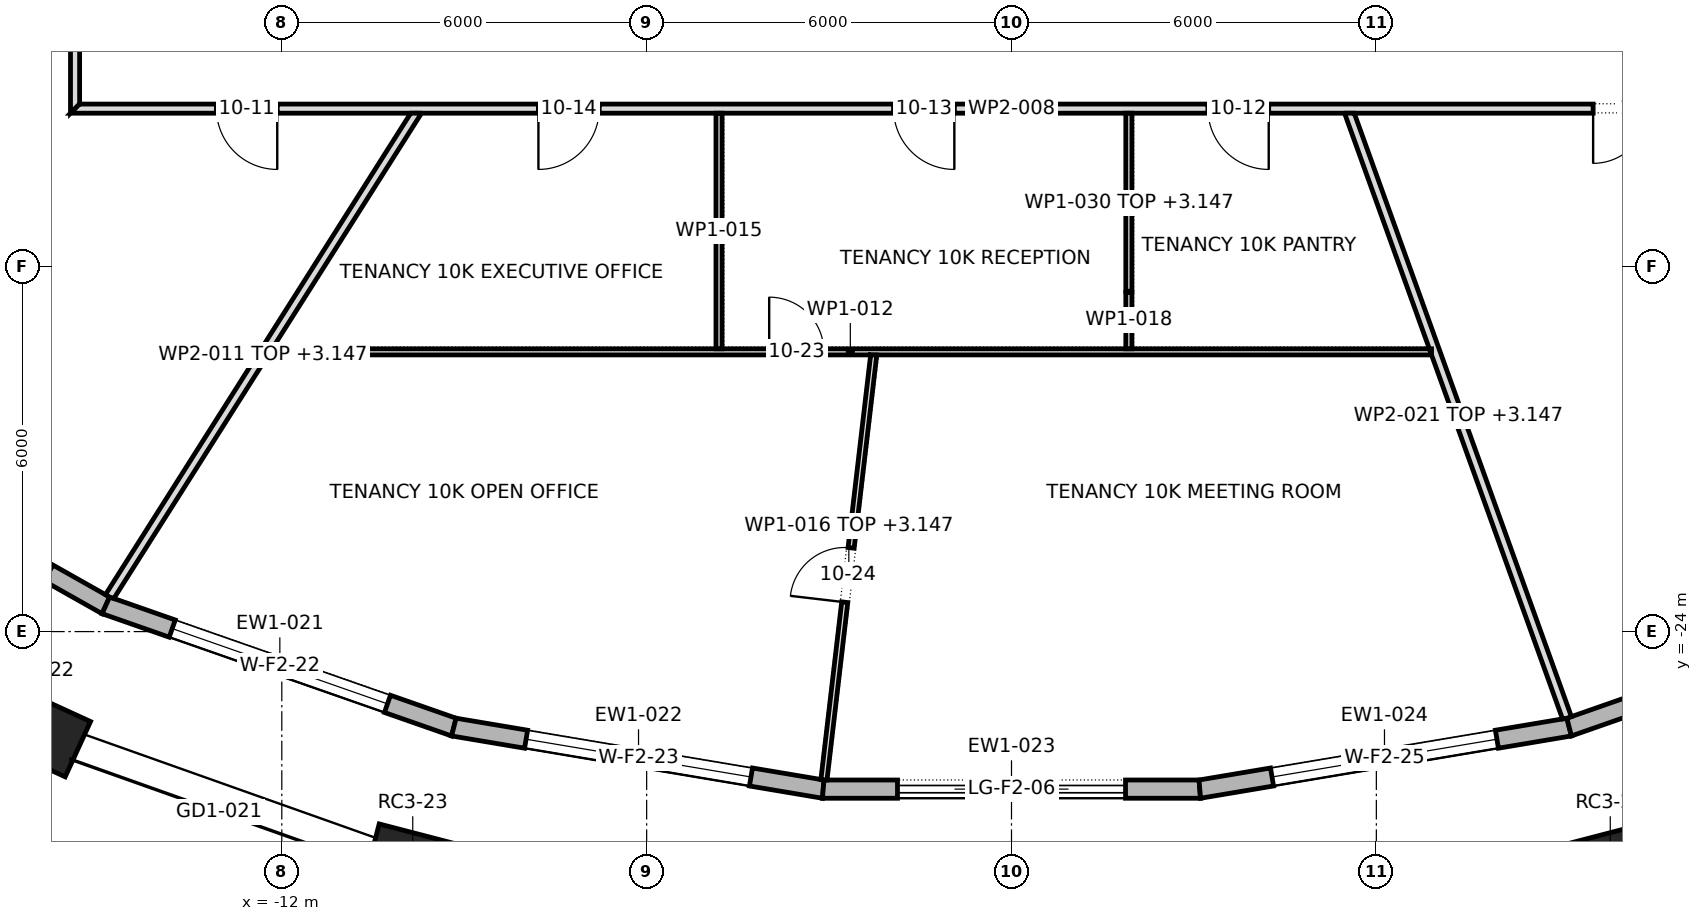
"""IFC4 building model, lengths in metres.
Left out: names, types, materials, properties, quantities, classifications, styles, units other than length and angle.
Written with IfcOpenShell. Run it as: python <this file> out.ifc"""

import sys

from ifc_helpers import new_model, si_unit, direction, frame, frame_2d, origin, origin_2d, place, context, subcontext, project, spatial, polyline, rectangle, outline, extrude, element, fill, save


model = new_model("IFC4")
c1 = context("Model", 3, precision=1e-05, world=origin(), true_north=direction((0.0, 1.0)))
c2 = subcontext(c1, "Body", "Model", "MODEL_VIEW")
j1 = project(units=[si_unit("LENGTHUNIT", "METRE"), si_unit("PLANEANGLEUNIT", "RADIAN")], contexts=[c1])
p1 = place(None, origin())
s1 = spatial("IfcSite", under=j1, at=p1, CompositionType="ELEMENT")
p2 = place(p1, origin())
s2 = spatial("IfcBuilding", under=s1, at=p2, CompositionType="ELEMENT")
p3 = place(p2, frame((0.0, 0.0, 150.7)))
s3 = spatial("IfcBuildingStorey", under=s2, at=p3, CompositionType="ELEMENT", Elevation=150.7)
for number, where, z_axis, x_axis in (
    (1, (-15.99, -25.642, 0.0), (0.0, 0.0, 1.0), (0.909, -0.417, 0.0)),
    (2, (-9.847, -27.823, 0.0), (0.0, 0.0, 1.0), (0.968, -0.252, 0.0)),
    (3, (9.847, -27.823, 0.0), (0.0, 0.0, 1.0), (0.968, 0.252, 0.0)),
):
    element("IfcColumn", number, at=place(p3, frame(where, z_axis=z_axis, x_axis=x_axis)), inside=s3, PredefinedType="COLUMN", context=c2, shape_type="SweptSolid", body=[
        extrude(rectangle(XDim=1.4, YDim=1.0, at=origin_2d()), origin(), (0.0, 0.0, 1.0), 4.2),
    ])
p4 = place(p3, frame((-20.046, -20.661, 0.0), z_axis=(0.0, 0.0, 1.0), x_axis=(0.870912346166, -0.491438384028, 0.0)))
e4 = element("IfcWall", 4, at=p4, inside=s3, PredefinedType="STANDARD", context=c2, shape_type="SweptSolid", body=[
    extrude(outline(polyline([(-0.014, -0.15), (5.929, -0.15), (5.902, 0.15), (0.014, 0.15), (-0.014, -0.15)])), origin(), (0.0, 0.0, 1.0), 3.9),
])
p5 = place(p4, frame((1.083, 0.0, 0.6)))
e5 = element("IfcOpeningElement", 5, at=p5, cuts=e4, PredefinedType="OPENING", context=c2, shape_type="SweptSolid", body=[
    extrude(rectangle(XDim=3.75, YDim=2.85, at=frame_2d((1.875, 1.425))), frame((0.0, 0.162, 0.0), z_axis=(0.0, -1.0, 0.0), x_axis=(1.0, 0.0, 0.0)), (0.0, 0.0, 1.0), 0.324),
])
p6 = place(p3, frame((-14.894, -23.569, 0.0), z_axis=(0.0, 0.0, 1.0), x_axis=(0.943925510212, -0.330158494016, 0.0)))
e6 = element("IfcWall", 6, at=p6, inside=s3, PredefinedType="STANDARD", context=c2, shape_type="SweptSolid", body=[
    extrude(outline(polyline([(-0.013, -0.15), (6.076, -0.15), (6.05, 0.15), (0.013, 0.15), (-0.013, -0.15)])), origin(), (0.0, 0.0, 1.0), 3.9),
])
p7 = place(p6, frame((1.156, 0.0, 0.6)))
e7 = element("IfcOpeningElement", 7, at=p7, cuts=e6, PredefinedType="OPENING", context=c2, shape_type="SweptSolid", body=[
    extrude(rectangle(XDim=3.75, YDim=2.85, at=frame_2d((1.875, 1.425))), frame((0.0, 0.162, 0.0), z_axis=(0.0, -1.0, 0.0), x_axis=(1.0, 0.0, 0.0)), (0.0, 0.0, 1.0), 0.324),
])
p8 = place(p3, frame((-9.171, -25.57, 0.0), z_axis=(0.0, 0.0, 1.0), x_axis=(0.986186393203, -0.165639360845, 0.0)))
e8 = element("IfcWall", 8, at=p8, inside=s3, PredefinedType="STANDARD", context=c2, shape_type="SweptSolid", body=[
    extrude(outline(polyline([(-0.013, -0.15), (6.172, -0.15), (6.147, 0.15), (0.013, 0.15), (-0.013, -0.15)])), origin(), (0.0, 0.0, 1.0), 3.9),
])
p9 = place(p8, frame((1.205, 0.0, 0.6)))
e9 = element("IfcOpeningElement", 9, at=p9, cuts=e8, PredefinedType="OPENING", context=c2, shape_type="SweptSolid", body=[
    extrude(rectangle(XDim=3.75, YDim=2.85, at=frame_2d((1.875, 1.425))), frame((0.0, 0.162, 0.0), z_axis=(0.0, -1.0, 0.0), x_axis=(1.0, 0.0, 0.0)), (0.0, 0.0, 1.0), 0.324),
])
p10 = place(p3, frame((-3.096, -26.591, 0.0), z_axis=(0.0, 0.0, 1.0), x_axis=(1.0, 0.0, 0.0)))
e10 = element("IfcWall", 10, at=p10, inside=s3, PredefinedType="STANDARD", context=c2, shape_type="SweptSolid", body=[
    extrude(outline(polyline([(-0.012, -0.15), (6.205, -0.15), (6.18, 0.15), (0.012, 0.15), (-0.012, -0.15)])), origin(), (0.0, 0.0, 1.0), 3.9),
])
p11 = place(p10, frame((1.221, 0.0, 0.0)))
e11 = element("IfcOpeningElement", 11, at=p11, cuts=e10, PredefinedType="OPENING", context=c2, shape_type="SweptSolid", body=[
    extrude(rectangle(XDim=3.75, YDim=3.45, at=frame_2d((1.875, 1.725))), frame((0.0, 0.162, 0.0), z_axis=(0.0, -1.0, 0.0), x_axis=(1.0, 0.0, 0.0)), (0.0, 0.0, 1.0), 0.324),
])
p12 = place(p3, frame((3.096, -26.591, 0.0), z_axis=(0.0, 0.0, 1.0), x_axis=(0.986186393203, 0.165639360845, 0.0)))
e12 = element("IfcWall", 12, at=p12, inside=s3, PredefinedType="STANDARD", context=c2, shape_type="SweptSolid", body=[
    extrude(outline(polyline([(-0.012, -0.15), (6.172, -0.15), (6.147, 0.15), (0.012, 0.15), (-0.012, -0.15)])), origin(), (0.0, 0.0, 1.0), 3.9),
])
p13 = place(p12, frame((1.205, 0.0, 0.6)))
e13 = element("IfcOpeningElement", 13, at=p13, cuts=e12, PredefinedType="OPENING", context=c2, shape_type="SweptSolid", body=[
    extrude(rectangle(XDim=3.75, YDim=2.85, at=frame_2d((1.875, 1.425))), frame((0.0, 0.162, 0.0), z_axis=(0.0, -1.0, 0.0), x_axis=(1.0, 0.0, 0.0)), (0.0, 0.0, 1.0), 0.324),
])
p14 = place(p3, frame((9.171, -25.57, 0.0), z_axis=(0.0, 0.0, 1.0), x_axis=(0.943925510212, 0.330158494016, 0.0)))
e14 = element("IfcWall", 14, at=p14, inside=s3, PredefinedType="STANDARD", context=c2, shape_type="SweptSolid", body=[
    extrude(outline(polyline([(-0.013, -0.15), (6.076, -0.15), (6.05, 0.15), (0.013, 0.15), (-0.013, -0.15)])), origin(), (0.0, 0.0, 1.0), 3.9),
])
p15 = place(p14, frame((1.156, 0.0, 0.6)))
e15 = element("IfcOpeningElement", 15, at=p15, cuts=e14, PredefinedType="OPENING", context=c2, shape_type="SweptSolid", body=[
    extrude(rectangle(XDim=3.75, YDim=2.85, at=frame_2d((1.875, 1.425))), frame((0.0, 0.162, 0.0), z_axis=(0.0, -1.0, 0.0), x_axis=(1.0, 0.0, 0.0)), (0.0, 0.0, 1.0), 0.324),
])
p16 = place(p3, frame((-24.324, -16.859, 0.0), z_axis=(0.0, 0.0, 1.0), x_axis=(0.821700462415, 0.569919599652, 0.0)))
e16 = element("IfcWall", 16, at=p16, inside=s3, PredefinedType="PARTITIONING", context=c2, shape_type="SweptSolid", body=[
    extrude(outline(polyline([(0.025, -0.075), (1.807, -0.075), (3.589, -0.075), (5.371, -0.075), (7.153, -0.075), (8.935, -0.075), (10.717, -0.075), (10.82, 0.074), (10.82, 0.075), (9.249, 0.075), (7.677, 0.075), (6.105, 0.075), (6.104, 0.073), (6.102, 0.075), (4.576, 0.075), (3.051, 0.075), (1.525, 0.075), (0.0, 0.075), (0.0, 0.071), (0.004, 0.002), (0.025, -0.075)])), origin(), (0.0, 0.0, 1.0), 3.147),
])
p17 = place(p3, frame((-15.4, -15.475, 0.0), z_axis=(0.0, 0.0, 1.0), x_axis=(0.0, 1.0, 0.0)))
e17 = element("IfcWall", 17, at=p17, inside=s3, PredefinedType="PARTITIONING", context=c2, shape_type="SweptSolid", body=[
    extrude(outline(polyline([(0.15, -0.075), (2.066, -0.075), (3.981, -0.075), (5.897, -0.075), (7.812, -0.075), (9.728, -0.075), (11.644, -0.075), (13.56, -0.075), (15.475, -0.075), (17.391, -0.075), (19.306, -0.075), (21.222, -0.075), (23.138, -0.075), (25.053, -0.075), (26.969, -0.075), (28.885, -0.075), (30.8, -0.075), (30.95, 0.075), (29.016, 0.075), (27.081, 0.075), (25.147, 0.075), (23.212, 0.075), (21.278, 0.075), (19.344, 0.075), (17.409, 0.075), (15.475, 0.075), (13.541, 0.075), (11.606, 0.075), (9.672, 0.075), (7.738, 0.075), (5.803, 0.075), (3.869, 0.075), (1.935, 0.075), (0.0, 0.075), (0.15, -0.075)])), origin(), (0.0, 0.0, 1.0), 3.9),
])
p18 = place(p17, frame((24.245, 0.0, 0.0)))
e18 = element("IfcOpeningElement", 18, at=p18, cuts=e17, PredefinedType="OPENING", context=c2, shape_type="SweptSolid", body=[
    extrude(rectangle(XDim=1.8, YDim=2.1, at=frame_2d((0.9, 1.05))), frame((0.0, 0.087, 0.0), z_axis=(0.0, -1.0, 0.0), x_axis=(1.0, 0.0, 0.0)), (0.0, 0.0, 1.0), 0.174),
])
p19 = place(p17, frame((16.305, 0.0, 0.0)))
e19 = element("IfcOpeningElement", 19, at=p19, cuts=e17, PredefinedType="OPENING", context=c2, shape_type="SweptSolid", body=[
    extrude(rectangle(XDim=1.0, YDim=2.1, at=frame_2d((0.5, 1.05))), frame((0.0, 0.087, 0.0), z_axis=(0.0, -1.0, 0.0), x_axis=(1.0, 0.0, 0.0)), (0.0, 0.0, 1.0), 0.174),
])
p20 = place(p17, frame((9.0, 0.0, 0.0)))
e20 = element("IfcOpeningElement", 20, at=p20, cuts=e17, PredefinedType="OPENING", context=c2, shape_type="SweptSolid", body=[
    extrude(rectangle(XDim=1.0, YDim=2.1, at=frame_2d((0.5, 1.05))), frame((0.0, 0.087, 0.0), z_axis=(0.0, -1.0, 0.0), x_axis=(1.0, 0.0, 0.0)), (0.0, 0.0, 1.0), 0.174),
])
p21 = place(p3, frame((-15.475, -15.4, 0.0), z_axis=(0.0, 0.0, 1.0), x_axis=(1.0, 0.0, 0.0)))
e21 = element("IfcWall", 21, at=p21, inside=s3, PredefinedType="PARTITIONING", context=c2, shape_type="SweptSolid", body=[
    extrude(outline(polyline([(0.0, -0.075), (1.935, -0.075), (3.869, -0.075), (5.803, -0.075), (7.738, -0.075), (9.672, -0.075), (11.606, -0.075), (13.541, -0.075), (15.475, -0.075), (17.409, -0.075), (19.344, -0.075), (21.278, -0.075), (23.212, -0.075), (25.147, -0.075), (27.081, -0.075), (29.016, -0.075), (30.95, -0.075), (30.8, 0.075), (28.885, 0.075), (26.969, 0.075), (25.053, 0.075), (23.138, 0.075), (21.222, 0.075), (19.306, 0.075), (17.391, 0.075), (15.475, 0.075), (13.56, 0.075), (11.644, 0.075), (9.728, 0.075), (7.812, 0.075), (5.897, 0.075), (3.981, 0.075), (2.066, 0.075), (0.15, 0.075), (0.0, -0.075)])), origin(), (0.0, 0.0, 1.0), 3.9),
])
p22 = place(p21, frame((2.4, 0.0, 0.0)))
e22 = element("IfcOpeningElement", 22, at=p22, cuts=e21, PredefinedType="OPENING", context=c2, shape_type="SweptSolid", body=[
    extrude(rectangle(XDim=1.0, YDim=2.1, at=frame_2d((0.5, 1.05))), frame((0.0, 0.087, 0.0), z_axis=(0.0, -1.0, 0.0), x_axis=(1.0, 0.0, 0.0)), (0.0, 0.0, 1.0), 0.174),
])
p23 = place(p21, frame((18.705, 0.0, 0.0)))
e23 = element("IfcOpeningElement", 23, at=p23, cuts=e21, PredefinedType="OPENING", context=c2, shape_type="SweptSolid", body=[
    extrude(rectangle(XDim=1.0, YDim=2.1, at=frame_2d((0.5, 1.05))), frame((0.0, 0.087, 0.0), z_axis=(0.0, -1.0, 0.0), x_axis=(1.0, 0.0, 0.0)), (0.0, 0.0, 1.0), 0.174),
])
p24 = place(p21, frame((13.535, 0.0, 0.0)))
e24 = element("IfcOpeningElement", 24, at=p24, cuts=e21, PredefinedType="OPENING", context=c2, shape_type="SweptSolid", body=[
    extrude(rectangle(XDim=1.0, YDim=2.1, at=frame_2d((0.5, 1.05))), frame((0.0, 0.087, 0.0), z_axis=(0.0, -1.0, 0.0), x_axis=(1.0, 0.0, 0.0)), (0.0, 0.0, 1.0), 0.174),
])
p25 = place(p21, frame((7.695, 0.0, 0.0)))
e25 = element("IfcOpeningElement", 25, at=p25, cuts=e21, PredefinedType="OPENING", context=c2, shape_type="SweptSolid", body=[
    extrude(rectangle(XDim=1.0, YDim=2.1, at=frame_2d((0.5, 1.05))), frame((0.0, 0.087, 0.0), z_axis=(0.0, -1.0, 0.0), x_axis=(1.0, 0.0, 0.0)), (0.0, 0.0, 1.0), 0.174),
])
p26 = place(p21, frame((25.04, 0.0, 0.0)))
e26 = element("IfcOpeningElement", 26, at=p26, cuts=e21, PredefinedType="OPENING", context=c2, shape_type="SweptSolid", body=[
    extrude(rectangle(XDim=1.8, YDim=2.1, at=frame_2d((0.9, 1.05))), frame((0.0, 0.087, 0.0), z_axis=(0.0, -1.0, 0.0), x_axis=(1.0, 0.0, 0.0)), (0.0, 0.0, 1.0), 0.174),
])
p27 = place(p3, frame((-14.837, -23.432, 0.0), z_axis=(0.0, 0.0, 1.0), x_axis=(0.535485065479, 0.844544696655, 0.0)))
e27 = element("IfcWall", 27, at=p27, inside=s3, PredefinedType="PARTITIONING", context=c2, shape_type="SweptSolid", body=[
    extrude(outline(polyline([(0.02, -0.075), (1.639, -0.075), (3.257, -0.075), (4.876, -0.075), (4.88, -0.073), (4.881, -0.075), (6.411, -0.075), (7.94, -0.075), (9.469, -0.075), (9.469, -0.074), (9.375, 0.075), (7.5, 0.075), (5.625, 0.075), (3.75, 0.075), (1.875, 0.075), (0.0, 0.075), (0.0, 0.066), (0.004, -0.004), (0.02, -0.075)])), origin(), (0.0, 0.0, 1.0), 3.147),
])
p28 = place(p3, frame((-12.222, -19.4, 0.0), z_axis=(0.0, 0.0, 1.0), x_axis=(1.0, 0.0, 0.0)))
e28 = element("IfcWall", 28, at=p28, inside=s3, PredefinedType="PARTITIONING", context=c2, shape_type="SweptSolid", body=[
    extrude(outline(polyline([(0.0, -0.05), (1.981, -0.05), (3.962, -0.05), (5.944, -0.05), (7.925, -0.05), (9.906, -0.05), (9.906, -0.049), (9.916, -0.05), (11.759, -0.05), (13.602, -0.05), (15.444, -0.05), (17.287, -0.05), (19.13, -0.05), (19.13, -0.05), (19.094, 0.05), (17.464, 0.05), (15.833, 0.05), (14.202, 0.05), (14.202, 0.05), (14.102, 0.05), (14.102, 0.05), (12.442, 0.05), (10.782, 0.05), (9.122, 0.05), (7.462, 0.05), (7.462, 0.05), (7.362, 0.05), (7.362, 0.05), (5.538, 0.05), (3.713, 0.05), (1.888, 0.05), (0.063, 0.05), (0.0, -0.049), (0.0, -0.05)])), origin(), (0.0, 0.0, 1.0), 3.9),
])
p29 = place(p28, frame((8.238, 0.0, 0.0)))
e29 = element("IfcOpeningElement", 29, at=p29, cuts=e28, PredefinedType="OPENING", context=c2, shape_type="SweptSolid", body=[
    extrude(rectangle(XDim=0.9, YDim=2.1, at=frame_2d((0.45, 1.05))), frame((0.0, 0.062, 0.0), z_axis=(0.0, -1.0, 0.0), x_axis=(1.0, 0.0, 0.0)), (0.0, 0.0, 1.0), 0.124),
])
p30 = place(p3, frame((-4.81, -19.35, 0.0), z_axis=(0.0, 0.0, 1.0), x_axis=(0.0, 1.0, 0.0)))
e30 = element("IfcWall", 30, at=p30, inside=s3, PredefinedType="PARTITIONING", context=c2, shape_type="SweptSolid", body=[
    extrude(rectangle(XDim=3.875, YDim=0.1, at=frame_2d((1.938, 0.0))), origin(), (0.0, 0.0, 1.0), 3.9),
])
p31 = place(p3, frame((-2.265, -19.444, 0.0), z_axis=(0.0, 0.0, 1.0), x_axis=(-0.116388626605, -0.993203749287, 0.0)))
e31 = element("IfcWall", 31, at=p31, inside=s3, PredefinedType="PARTITIONING", context=c2, shape_type="SweptSolid", body=[
    extrude(outline(polyline([(0.012, -0.05), (1.769, -0.05), (3.527, -0.05), (5.284, -0.05), (7.042, -0.05), (7.042, -0.049), (7.042, 0.022), (7.039, 0.05), (5.279, 0.05), (3.519, 0.05), (1.76, 0.05), (0.0, 0.05), (0.012, -0.05)])), origin(), (0.0, 0.0, 1.0), 3.147),
])
p32 = place(p31, frame((3.201, 0.0, 0.0)))
e32 = element("IfcOpeningElement", 32, at=p32, cuts=e31, PredefinedType="OPENING", context=c2, shape_type="SweptSolid", body=[
    extrude(rectangle(XDim=0.9, YDim=2.1, at=frame_2d((0.45, 1.05))), frame((0.0, 0.062, 0.0), z_axis=(0.0, -1.0, 0.0), x_axis=(1.0, 0.0, 0.0)), (0.0, 0.0, 1.0), 0.124),
])
p33 = place(p3, frame((1.93, -19.35, 0.0), z_axis=(0.0, 0.0, 1.0), x_axis=(0.0, 1.0, 0.0)))
e33 = element("IfcWall", 33, at=p33, inside=s3, PredefinedType="PARTITIONING", context=c2, shape_type="SweptSolid", body=[
    extrude(rectangle(XDim=0.938, YDim=0.1, at=frame_2d((0.469, 0.0))), origin(), (0.0, 0.0, 1.0), 3.9),
])
p34 = place(p3, frame((5.548, -15.45, 0.0), z_axis=(0.0, 0.0, 1.0), x_axis=(0.338602834386, -0.940929391902, 0.0)))
e34 = element("IfcWall", 34, at=p34, inside=s3, PredefinedType="PARTITIONING", context=c2, shape_type="SweptSolid", body=[
    extrude(outline(polyline([(0.0, -0.075), (1.373, -0.075), (2.745, -0.075), (4.118, -0.075), (4.13, -0.041), (4.224, -0.075), (5.814, -0.075), (7.405, -0.075), (8.996, -0.075), (10.586, -0.075), (10.599, -0.004), (10.6, 0.048), (10.6, 0.075), (8.842, 0.075), (7.084, 0.075), (5.327, 0.075), (3.569, 0.075), (1.811, 0.075), (0.054, 0.075), (0.0, -0.074), (0.0, -0.075)])), origin(), (0.0, 0.0, 1.0), 3.147),
])
p35 = place(p3, frame((1.93, -18.413, 0.0), z_axis=(0.0, 0.0, 1.0), x_axis=(0.0, 1.0, 0.0)))
e35 = element("IfcWall", 35, at=p35, inside=s3, PredefinedType="PARTITIONING", context=c2, shape_type="SweptSolid", body=[
    extrude(rectangle(XDim=2.938, YDim=0.1, at=frame_2d((1.469, 0.0))), origin(), (0.0, 0.0, 1.0), 3.147),
])
p36 = place(p7, origin())
e36 = element("IfcWindow", 36, at=p36, inside=s3, PartitioningType="TRIPLE_PANEL_VERTICAL", PredefinedType="WINDOW", context=c2, shape_type="SweptSolid", body=[
    extrude(rectangle(XDim=3.75, YDim=2.85, at=frame_2d((1.875, 1.425))), frame((0.0, 0.03, 0.0), z_axis=(0.0, -1.0, 0.0), x_axis=(1.0, 0.0, 0.0)), (0.0, 0.0, 1.0), 0.06),
])
fill(e7, e36)
p37 = place(p9, origin())
e37 = element("IfcWindow", 37, at=p37, inside=s3, PartitioningType="TRIPLE_PANEL_VERTICAL", PredefinedType="WINDOW", context=c2, shape_type="SweptSolid", body=[
    extrude(rectangle(XDim=3.75, YDim=2.85, at=frame_2d((1.875, 1.425))), frame((0.0, 0.03, 0.0), z_axis=(0.0, -1.0, 0.0), x_axis=(1.0, 0.0, 0.0)), (0.0, 0.0, 1.0), 0.06),
])
fill(e9, e37)
p38 = place(p11, origin())
e38 = element("IfcDoor", 38, at=p38, inside=s3, OperationType="DOUBLE_DOOR_SLIDING", PredefinedType="DOOR", context=c2, shape_type="SweptSolid", body=[
    extrude(rectangle(XDim=3.75, YDim=3.45, at=frame_2d((1.875, 1.725))), frame((0.0, 0.025, 0.0), z_axis=(0.0, -1.0, 0.0), x_axis=(1.0, 0.0, 0.0)), (0.0, 0.0, 1.0), 0.05),
])
fill(e11, e38)
p39 = place(p13, origin())
e39 = element("IfcWindow", 39, at=p39, inside=s3, PartitioningType="TRIPLE_PANEL_VERTICAL", PredefinedType="WINDOW", context=c2, shape_type="SweptSolid", body=[
    extrude(rectangle(XDim=3.75, YDim=2.85, at=frame_2d((1.875, 1.425))), frame((0.0, 0.03, 0.0), z_axis=(0.0, -1.0, 0.0), x_axis=(1.0, 0.0, 0.0)), (0.0, 0.0, 1.0), 0.06),
])
fill(e13, e39)
p40 = place(p22, frame((1.0, 0.0, 0.0), z_axis=(0.0, 0.0, 1.0), x_axis=(-1.0, 0.0, 0.0)))
e40 = element("IfcDoor", 40, at=p40, inside=s3, OperationType="SINGLE_SWING_RIGHT", PredefinedType="DOOR", context=c2, shape_type="SweptSolid", body=[
    extrude(rectangle(XDim=1.0, YDim=2.1, at=frame_2d((0.5, 1.05))), frame((0.0, 0.025, 0.0), z_axis=(0.0, -1.0, 0.0), x_axis=(1.0, 0.0, 0.0)), (0.0, 0.0, 1.0), 0.05),
])
fill(e22, e40)
p41 = place(p23, frame((1.0, 0.0, 0.0), z_axis=(0.0, 0.0, 1.0), x_axis=(-1.0, 0.0, 0.0)))
e41 = element("IfcDoor", 41, at=p41, inside=s3, OperationType="SINGLE_SWING_RIGHT", PredefinedType="DOOR", context=c2, shape_type="SweptSolid", body=[
    extrude(rectangle(XDim=1.0, YDim=2.1, at=frame_2d((0.5, 1.05))), frame((0.0, 0.025, 0.0), z_axis=(0.0, -1.0, 0.0), x_axis=(1.0, 0.0, 0.0)), (0.0, 0.0, 1.0), 0.05),
])
fill(e23, e41)
p42 = place(p24, frame((1.0, 0.0, 0.0), z_axis=(0.0, 0.0, 1.0), x_axis=(-1.0, 0.0, 0.0)))
e42 = element("IfcDoor", 42, at=p42, inside=s3, OperationType="SINGLE_SWING_RIGHT", PredefinedType="DOOR", context=c2, shape_type="SweptSolid", body=[
    extrude(rectangle(XDim=1.0, YDim=2.1, at=frame_2d((0.5, 1.05))), frame((0.0, 0.025, 0.0), z_axis=(0.0, -1.0, 0.0), x_axis=(1.0, 0.0, 0.0)), (0.0, 0.0, 1.0), 0.05),
])
fill(e24, e42)
p43 = place(p25, frame((1.0, 0.0, 0.0), z_axis=(0.0, 0.0, 1.0), x_axis=(-1.0, 0.0, 0.0)))
e43 = element("IfcDoor", 43, at=p43, inside=s3, OperationType="SINGLE_SWING_LEFT", PredefinedType="DOOR", context=c2, shape_type="SweptSolid", body=[
    extrude(rectangle(XDim=1.0, YDim=2.1, at=frame_2d((0.5, 1.05))), frame((0.0, 0.025, 0.0), z_axis=(0.0, -1.0, 0.0), x_axis=(1.0, 0.0, 0.0)), (0.0, 0.0, 1.0), 0.05),
])
fill(e25, e43)
p44 = place(p26, frame((1.8, 0.0, 0.0), z_axis=(0.0, 0.0, 1.0), x_axis=(-1.0, 0.0, 0.0)))
e44 = element("IfcDoor", 44, at=p44, inside=s3, OperationType="DOUBLE_DOOR_SINGLE_SWING", PredefinedType="DOOR", context=c2, shape_type="SweptSolid", body=[
    extrude(rectangle(XDim=1.8, YDim=2.1, at=frame_2d((0.9, 1.05))), frame((0.0, 0.025, 0.0), z_axis=(0.0, -1.0, 0.0), x_axis=(1.0, 0.0, 0.0)), (0.0, 0.0, 1.0), 0.05),
])
fill(e26, e44)
p45 = place(p29, origin())
e45 = element("IfcDoor", 45, at=p45, inside=s3, OperationType="SINGLE_SWING_RIGHT", PredefinedType="DOOR", context=c2, shape_type="SweptSolid", body=[
    extrude(rectangle(XDim=0.9, YDim=2.1, at=frame_2d((0.45, 1.05))), frame((0.0, 0.025, 0.0), z_axis=(0.0, -1.0, 0.0), x_axis=(1.0, 0.0, 0.0)), (0.0, 0.0, 1.0), 0.05),
])
fill(e29, e45)
p46 = place(p32, frame((0.9, 0.0, 0.0), z_axis=(0.0, 0.0, 1.0), x_axis=(-1.0, 0.0, 0.0)))
e46 = element("IfcDoor", 46, at=p46, inside=s3, OperationType="SINGLE_SWING_RIGHT", PredefinedType="DOOR", context=c2, shape_type="SweptSolid", body=[
    extrude(rectangle(XDim=0.9, YDim=2.1, at=frame_2d((0.45, 1.05))), frame((0.0, 0.025, 0.0), z_axis=(0.0, -1.0, 0.0), x_axis=(1.0, 0.0, 0.0)), (0.0, 0.0, 1.0), 0.05),
])
fill(e32, e46)
save(model, sys.argv[1])
